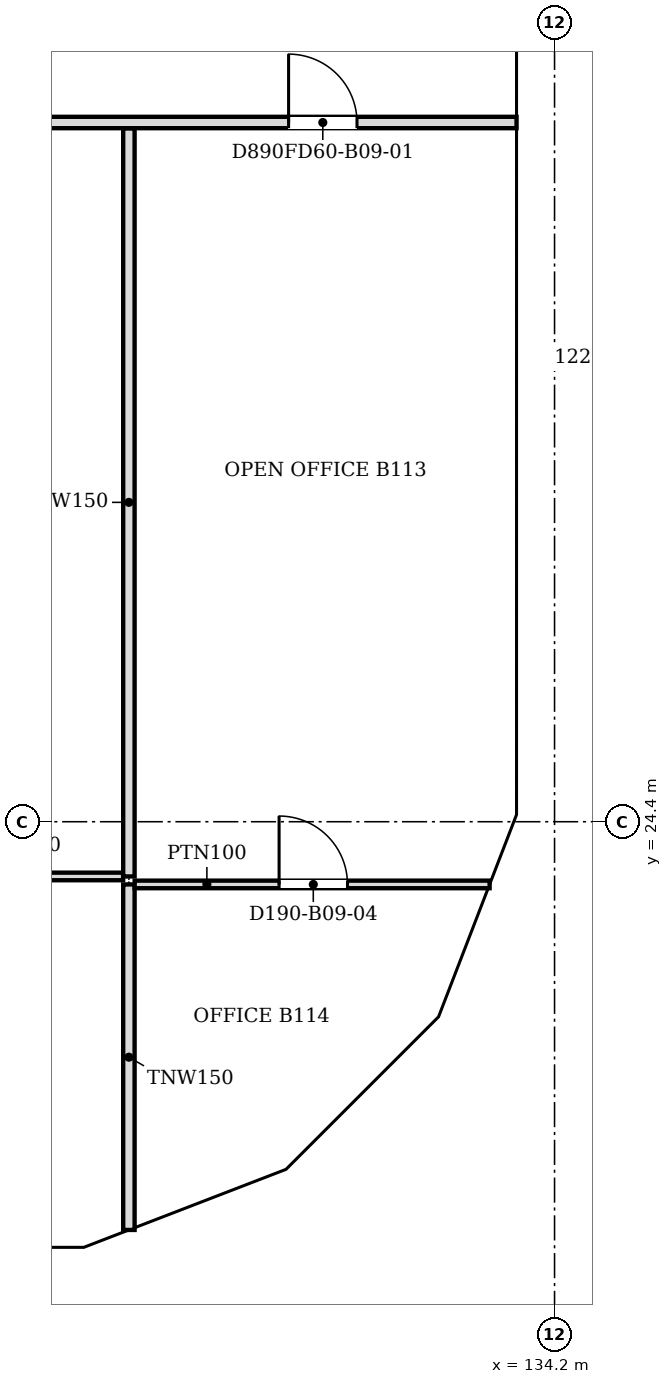
"""IFC4 building model, lengths in metres.
Left out: names, types, materials, properties, quantities, classifications, styles, units other than length and angle.
Written with IfcOpenShell. Run it as: python <this file> out.ifc"""

import sys

from ifc_helpers import new_model, si_unit, direction, frame, frame_2d, origin, place, context, subcontext, project, spatial, polyline, rectangle, outline, extrude, faceted_brep, source, transform, mapped, element, fill, save


model = new_model("IFC4")
c1 = context("Model", 3, precision=1e-05, world=origin(), true_north=direction((0.0, 1.0)))
c2 = subcontext(c1, "Body", "Model", "MODEL_VIEW")
j1 = project(units=[si_unit("LENGTHUNIT", "METRE"), si_unit("PLANEANGLEUNIT", "RADIAN")], contexts=[c1])
p1 = place(None, origin())
s1 = spatial("IfcSite", under=j1, at=p1, CompositionType="ELEMENT")
p2 = place(p1, origin())
s2 = spatial("IfcBuilding", under=s1, at=p2, CompositionType="ELEMENT")
p3 = place(p2, frame((0.0, 0.0, 91.4)))
s3 = spatial("IfcBuildingStorey", under=s2, at=p3, CompositionType="ELEMENT", Elevation=91.4)
m1 = source(origin(), c2, "Body", "Brep", [
    faceted_brep([(3.003, -0.25, 0.0), (3.05, -0.25, 0.06), (3.05, -0.25, 7.54), (3.003, -0.25, 7.6), (0.0, -0.25, 3.8), (0.0, 0.25, 3.8), (2.957, 0.25, 7.541), (2.957, 0.25, 0.059), (3.003, 0.0, 0.0), (3.003, 0.0, 7.6)], [[[0, 1, 2, 3, 4]], [[5, 6, 7]], [[1, 0, 8]], [[9, 3, 2]], [[6, 5, 4, 3, 9]], [[5, 7, 8, 0, 4]], [[1, 8, 7, 6, 9, 2]]]),
])
p4 = place(p3, frame((125.05, 18.55, -3.8), z_axis=(0.0, 0.0, 1.0), x_axis=(1.0, 0.0, 0.0)))
e1 = element("IfcWall", 1, at=p4, inside=s3, PredefinedType="SOLIDWALL", context=c2, shape_type="MappedRepresentation", body=[
    mapped(m1, transform((0.0, 0.0, 0.0), scale=1.0)),
])
m2 = source(origin(), c2, "Body", "SweptSolid", [
    extrude(outline(polyline([(2.803, 6.944), (0.319, 3.8), (2.803, 0.656), (2.803, 6.944)])), frame((0.0, 0.26, 0.0), z_axis=(0.0, -1.0, 0.0), x_axis=(1.0, 0.0, 0.0)), (0.0, 0.0, 1.0), 0.52),
])
p5 = place(p4, origin())
e2 = element("IfcOpeningElement", 2, at=p5, cuts=e1, PredefinedType="OPENING", context=c2, shape_type="MappedRepresentation", body=[
    mapped(m2, transform((0.0, 0.0, 0.0), scale=1.0)),
])
m3 = source(origin(), c2, "Body", "Brep", [
    faceted_brep([(0.047, -0.25, 0.0), (2.997, -0.25, 3.8), (0.047, -0.25, 7.6), (0.0, -0.25, 7.541), (0.0, -0.25, 0.059), (0.093, 0.25, 7.54), (2.944, 0.25, 3.868), (2.944, 0.25, 3.732), (0.093, 0.25, 0.06), (2.997, 0.0, 3.8), (0.047, 0.0, 0.0), (0.047, 0.0, 7.6)], [[[0, 1, 2, 3, 4]], [[5, 6, 7, 8]], [[8, 7, 9, 1, 0, 10]], [[6, 5, 11, 2, 1, 9]], [[3, 2, 11]], [[10, 0, 4]], [[8, 10, 4, 3, 11, 5]], [[9, 7, 6]]]),
])
p6 = place(p3, frame((128.01, 18.533, -3.8), z_axis=(0.0, 0.0, 1.0), x_axis=(0.932990326376, 0.359901446078, 0.0)))
e3 = element("IfcWall", 3, at=p6, inside=s3, PredefinedType="SOLIDWALL", context=c2, shape_type="MappedRepresentation", body=[
    mapped(m3, transform((0.0, 0.0, 0.0), scale=1.0)),
])
m4 = source(origin(), c2, "Body", "SweptSolid", [
    extrude(outline(polyline([(0.247, 0.665), (2.681, 3.8), (0.247, 6.935), (0.247, 0.665)])), frame((0.0, 0.26, 0.0), z_axis=(0.0, -1.0, 0.0), x_axis=(1.0, 0.0, 0.0)), (0.0, 0.0, 1.0), 0.52),
])
p7 = place(p6, origin())
e4 = element("IfcOpeningElement", 4, at=p7, cuts=e3, PredefinedType="OPENING", context=c2, shape_type="MappedRepresentation", body=[
    mapped(m4, transform((0.0, 0.0, 0.0), scale=1.0)),
])
m5 = source(origin(), c2, "Body", "Brep", [
    faceted_brep([(2.944, -0.25, 0.0), (2.997, -0.25, 0.068), (2.997, -0.25, 7.532), (2.944, -0.25, 7.6), (0.0, -0.25, 3.8), (0.053, 0.25, 3.868), (2.891, 0.25, 7.532), (2.891, 0.25, 0.068), (0.053, 0.25, 3.731), (2.944, 0.0, 0.0), (2.944, 0.0, 7.6), (0.0, 0.0, 3.8)], [[[0, 1, 2, 3, 4]], [[5, 6, 7, 8]], [[1, 0, 9]], [[10, 3, 2]], [[6, 5, 11, 4, 3, 10]], [[8, 7, 9, 0, 4, 11]], [[8, 11, 5]], [[1, 9, 7, 6, 10, 2]]]),
])
p8 = place(p3, frame((130.806, 19.612, -3.8), z_axis=(0.0, 0.0, 1.0), x_axis=(0.707106781187, 0.707106781187, 0.0)))
e5 = element("IfcWall", 5, at=p8, inside=s3, PredefinedType="SOLIDWALL", context=c2, shape_type="MappedRepresentation", body=[
    mapped(m5, transform((0.0, 0.0, 0.0), scale=1.0)),
])
m6 = source(origin(), c2, "Body", "SweptSolid", [
    extrude(outline(polyline([(2.744, 6.934), (0.316, 3.8), (2.744, 0.666), (2.744, 6.934)])), frame((0.0, 0.26, 0.0), z_axis=(0.0, -1.0, 0.0), x_axis=(1.0, 0.0, 0.0)), (0.0, 0.0, 1.0), 0.52),
])
p9 = place(p8, origin())
e6 = element("IfcOpeningElement", 6, at=p9, cuts=e5, PredefinedType="OPENING", context=c2, shape_type="MappedRepresentation", body=[
    mapped(m6, transform((0.0, 0.0, 0.0), scale=1.0)),
])
m7 = source(origin(), c2, "Body", "Brep", [
    faceted_brep([(0.053, -0.25, 0.0), (3.003, -0.25, 3.8), (0.053, -0.25, 7.6), (0.0, -0.25, 7.531), (0.0, -0.25, 0.068), (0.106, 0.25, 7.532), (2.957, 0.25, 3.86), (2.957, 0.25, 3.74), (0.106, 0.25, 0.068), (3.003, 0.0, 3.8), (0.053, 0.0, 0.0), (0.053, 0.0, 7.6)], [[[0, 1, 2, 3, 4]], [[5, 6, 7, 8]], [[8, 7, 9, 1, 0, 10]], [[6, 5, 11, 2, 1, 9]], [[3, 2, 11]], [[10, 0, 4]], [[8, 10, 4, 3, 11, 5]], [[9, 7, 6]]]),
])
p10 = place(p3, frame((132.869, 21.644, -3.8), z_axis=(0.0, 0.0, 1.0), x_axis=(0.359855894603, 0.933007896601, 0.0)))
e7 = element("IfcWall", 7, at=p10, inside=s3, PredefinedType="SOLIDWALL", context=c2, shape_type="MappedRepresentation", body=[
    mapped(m7, transform((0.0, 0.0, 0.0), scale=1.0)),
])
m8 = source(origin(), c2, "Body", "SweptSolid", [
    extrude(outline(polyline([(0.253, 0.665), (2.687, 3.8), (0.253, 6.935), (0.253, 0.665)])), frame((0.0, 0.26, 0.0), z_axis=(0.0, -1.0, 0.0), x_axis=(1.0, 0.0, 0.0)), (0.0, 0.0, 1.0), 0.52),
])
p11 = place(p10, origin())
e8 = element("IfcOpeningElement", 8, at=p11, cuts=e7, PredefinedType="OPENING", context=c2, shape_type="MappedRepresentation", body=[
    mapped(m8, transform((0.0, 0.0, 0.0), scale=1.0)),
])
m9 = source(origin(), c2, "Body", "Brep", [
    faceted_brep([(3.003, -0.25, 0.0), (6.053, -0.25, 3.8), (3.003, -0.25, 7.6), (0.0, -0.25, 3.8), (0.047, 0.25, 3.859), (3.003, 0.25, 7.6), (6.053, 0.25, 3.8), (3.003, 0.25, 0.0), (0.047, 0.25, 3.741), (0.0, 0.0, 3.8)], [[[0, 1, 2, 3]], [[4, 5, 6, 7, 8]], [[7, 6, 1, 0]], [[6, 5, 2, 1]], [[5, 4, 9, 3, 2]], [[8, 7, 0, 3, 9]], [[8, 9, 4]]]),
])
p12 = place(p3, frame((133.95, 24.447, -3.8), z_axis=(0.0, 0.0, 1.0), x_axis=(0.0, 1.0, 0.0)))
e9 = element("IfcWall", 9, at=p12, inside=s3, PredefinedType="SOLIDWALL", context=c2, shape_type="MappedRepresentation", body=[
    mapped(m9, transform((0.0, 0.0, 0.0), scale=1.0)),
])
m10 = source(origin(), c2, "Body", "SweptSolid", [
    extrude(outline(polyline([(3.005, 0.401), (5.733, 3.8), (3.005, 7.199), (0.319, 3.8), (3.005, 0.401)])), frame((0.0, 0.26, 0.0), z_axis=(0.0, -1.0, 0.0), x_axis=(1.0, 0.0, 0.0)), (0.0, 0.0, 1.0), 0.52),
])
p13 = place(p12, origin())
e10 = element("IfcOpeningElement", 10, at=p13, cuts=e9, PredefinedType="OPENING", context=c2, shape_type="MappedRepresentation", body=[
    mapped(m10, transform((0.0, 0.0, 0.0), scale=1.0)),
])
m11 = source(origin(), c2, "Body", "SweptSolid", [
    extrude(outline(polyline([(3.05, 0.0), (6.1, 3.8), (3.05, 7.6), (0.0, 3.8), (3.05, 0.0)])), frame((0.0, 0.25, 0.0), z_axis=(0.0, -1.0, 0.0), x_axis=(1.0, 0.0, 0.0)), (0.0, 0.0, 1.0), 0.5),
])
p14 = place(p3, frame((133.95, 30.5, -3.8), z_axis=(0.0, 0.0, 1.0), x_axis=(0.0, 1.0, 0.0)))
e11 = element("IfcWall", 11, at=p14, inside=s3, PredefinedType="SOLIDWALL", context=c2, shape_type="MappedRepresentation", body=[
    mapped(m11, transform((0.0, 0.0, 0.0), scale=1.0)),
])
m12 = source(origin(), c2, "Body", "SweptSolid", [
    extrude(outline(polyline([(3.05, 0.399), (5.78, 3.8), (3.05, 7.2), (0.321, 3.8), (3.05, 0.399)])), frame((0.0, 0.26, 0.0), z_axis=(0.0, -1.0, 0.0), x_axis=(1.0, 0.0, 0.0)), (0.0, 0.0, 1.0), 0.52),
])
p15 = place(p14, origin())
e12 = element("IfcOpeningElement", 12, at=p15, cuts=e11, PredefinedType="OPENING", context=c2, shape_type="MappedRepresentation", body=[
    mapped(m12, transform((0.0, 0.0, 0.0), scale=1.0)),
])
m13 = source(origin(), c2, "Body", "Brep", [
    faceted_brep([(3.05, -0.25, 0.0), (6.053, -0.25, 3.8), (0.0, -0.25, 3.8), (0.0, 0.25, 3.8), (6.007, 0.25, 3.8), (6.007, 0.25, 3.741), (3.05, 0.25, 0.0), (6.053, 0.0, 3.8)], [[[0, 1, 2]], [[3, 4, 5, 6]], [[6, 5, 7, 1, 0]], [[4, 3, 2, 1, 7]], [[3, 6, 0, 2]], [[5, 4, 7]]]),
])
p16 = place(p3, frame((122.0, 18.55, 0.0), z_axis=(0.0, 0.0, 1.0), x_axis=(1.0, 0.0, 0.0)))
e13 = element("IfcWall", 13, at=p16, inside=s3, PredefinedType="SOLIDWALL", context=c2, shape_type="MappedRepresentation", body=[
    mapped(m13, transform((0.0, 0.0, 0.0), scale=1.0)),
])
m14 = source(origin(), c2, "Body", "SweptSolid", [
    extrude(outline(polyline([(3.049, 0.401), (5.537, 3.55), (0.521, 3.55), (3.049, 0.401)])), frame((0.0, 0.26, 0.0), z_axis=(0.0, -1.0, 0.0), x_axis=(1.0, 0.0, 0.0)), (0.0, 0.0, 1.0), 0.52),
])
p17 = place(p16, origin())
e14 = element("IfcOpeningElement", 14, at=p17, cuts=e13, PredefinedType="OPENING", context=c2, shape_type="MappedRepresentation", body=[
    mapped(m14, transform((0.0, 0.0, 0.0), scale=1.0)),
])
m15 = source(origin(), c2, "Body", "Brep", [
    faceted_brep([(2.95, -0.25, 0.0), (3.003, -0.25, 0.068), (3.003, -0.25, 3.8), (0.0, -0.25, 3.8), (0.047, 0.25, 3.8), (2.898, 0.25, 3.8), (2.898, 0.25, 0.068), (0.047, 0.25, 3.74), (2.95, 0.0, 0.0), (0.0, 0.0, 3.8)], [[[0, 1, 2, 3]], [[4, 5, 6, 7]], [[1, 0, 8]], [[5, 4, 9, 3, 2]], [[7, 6, 8, 0, 3, 9]], [[7, 9, 4]], [[1, 8, 6, 5, 2]]]),
])
p18 = place(p3, frame((128.053, 18.55, 0.0), z_axis=(0.0, 0.0, 1.0), x_axis=(0.933007896601, 0.359855894603, 0.0)))
e15 = element("IfcWall", 15, at=p18, inside=s3, PredefinedType="SOLIDWALL", context=c2, shape_type="MappedRepresentation", body=[
    mapped(m15, transform((0.0, 0.0, 0.0), scale=1.0)),
])
m16 = source(origin(), c2, "Body", "SweptSolid", [
    extrude(outline(polyline([(2.75, 3.55), (0.511, 3.55), (2.75, 0.665), (2.75, 3.55)])), frame((0.0, 0.26, 0.0), z_axis=(0.0, -1.0, 0.0), x_axis=(1.0, 0.0, 0.0)), (0.0, 0.0, 1.0), 0.52),
])
p19 = place(p18, origin())
e16 = element("IfcOpeningElement", 16, at=p19, cuts=e15, PredefinedType="OPENING", context=c2, shape_type="MappedRepresentation", body=[
    mapped(m16, transform((0.0, 0.0, 0.0), scale=1.0)),
])
m17 = source(origin(), c2, "Body", "Brep", [
    faceted_brep([(0.053, -0.25, 0.0), (2.997, -0.25, 3.8), (0.0, -0.25, 3.8), (0.0, -0.25, 0.068), (0.106, 0.25, 3.8), (2.944, 0.25, 3.8), (2.944, 0.25, 3.732), (0.106, 0.25, 0.068), (2.997, 0.0, 3.8), (0.053, 0.0, 0.0)], [[[0, 1, 2, 3]], [[4, 5, 6, 7]], [[7, 6, 8, 1, 0, 9]], [[5, 4, 2, 1, 8]], [[9, 0, 3]], [[7, 9, 3, 2, 4]], [[6, 5, 8]]]),
])
p20 = place(p3, frame((130.769, 19.574, 0.0), z_axis=(0.0, 0.0, 1.0), x_axis=(0.707106781187, 0.707106781187, 0.0)))
e17 = element("IfcWall", 17, at=p20, inside=s3, PredefinedType="SOLIDWALL", context=c2, shape_type="MappedRepresentation", body=[
    mapped(m17, transform((0.0, 0.0, 0.0), scale=1.0)),
])
m18 = source(origin(), c2, "Body", "SweptSolid", [
    extrude(outline(polyline([(0.253, 0.667), (2.487, 3.55), (0.253, 3.55), (0.253, 0.667)])), frame((0.0, 0.26, 0.0), z_axis=(0.0, -1.0, 0.0), x_axis=(1.0, 0.0, 0.0)), (0.0, 0.0, 1.0), 0.52),
])
p21 = place(p20, origin())
e18 = element("IfcOpeningElement", 18, at=p21, cuts=e17, PredefinedType="OPENING", context=c2, shape_type="MappedRepresentation", body=[
    mapped(m18, transform((0.0, 0.0, 0.0), scale=1.0)),
])
m19 = source(origin(), c2, "Body", "Brep", [
    faceted_brep([(2.95, -0.25, 0.0), (2.997, -0.25, 0.059), (2.997, -0.25, 3.8), (0.0, -0.25, 3.8), (0.053, 0.25, 3.8), (2.904, 0.25, 3.8), (2.904, 0.25, 0.06), (0.053, 0.25, 3.732), (2.95, 0.0, 0.0), (0.0, 0.0, 3.8)], [[[0, 1, 2, 3]], [[4, 5, 6, 7]], [[1, 0, 8]], [[5, 4, 9, 3, 2]], [[7, 6, 8, 0, 3, 9]], [[7, 9, 4]], [[1, 8, 6, 5, 2]]]),
])
p22 = place(p3, frame((132.888, 21.694, 0.0), z_axis=(0.0, 0.0, 1.0), x_axis=(0.359901446078, 0.932990326376, 0.0)))
e19 = element("IfcWall", 19, at=p22, inside=s3, PredefinedType="SOLIDWALL", context=c2, shape_type="MappedRepresentation", body=[
    mapped(m19, transform((0.0, 0.0, 0.0), scale=1.0)),
])
p23 = place(p22, origin())
e20 = element("IfcOpeningElement", 20, at=p23, cuts=e19, PredefinedType="OPENING", context=c2, shape_type="MappedRepresentation", body=[
    mapped(m16, transform((0.0, 0.0, 0.0), scale=1.0)),
])
m20 = source(origin(), c2, "Body", "Brep", [
    faceted_brep([(0.047, -0.25, 0.0), (3.05, -0.25, 3.8), (0.0, -0.25, 3.8), (0.0, -0.25, 0.06), (0.093, 0.25, 3.8), (3.05, 0.25, 3.8), (0.093, 0.25, 0.059), (0.047, 0.0, 0.0)], [[[0, 1, 2, 3]], [[4, 5, 6]], [[6, 5, 1, 0, 7]], [[5, 4, 2, 1]], [[7, 0, 3]], [[6, 7, 3, 2, 4]]]),
])
p24 = place(p3, frame((133.95, 24.4, 0.0), z_axis=(0.0, 0.0, 1.0), x_axis=(0.0, 1.0, 0.0)))
e21 = element("IfcWall", 21, at=p24, inside=s3, PredefinedType="SOLIDWALL", context=c2, shape_type="MappedRepresentation", body=[
    mapped(m20, transform((0.0, 0.0, 0.0), scale=1.0)),
])
m21 = source(origin(), c2, "Body", "SweptSolid", [
    extrude(outline(polyline([(0.247, 0.656), (2.534, 3.55), (0.247, 3.55), (0.247, 0.656)])), frame((0.0, 0.26, 0.0), z_axis=(0.0, -1.0, 0.0), x_axis=(1.0, 0.0, 0.0)), (0.0, 0.0, 1.0), 0.52),
])
p25 = place(p24, origin())
e22 = element("IfcOpeningElement", 22, at=p25, cuts=e21, PredefinedType="OPENING", context=c2, shape_type="MappedRepresentation", body=[
    mapped(m21, transform((0.0, 0.0, 0.0), scale=1.0)),
])
m22 = source(origin(), c2, "Body", "SweptSolid", [
    extrude(outline(polyline([(3.05, 0.0), (6.1, 3.8), (0.0, 3.8), (3.05, 0.0)])), frame((0.0, 0.25, 0.0), z_axis=(0.0, -1.0, 0.0), x_axis=(1.0, 0.0, 0.0)), (0.0, 0.0, 1.0), 0.5),
])
p26 = place(p3, frame((133.95, 27.45, 0.0), z_axis=(0.0, 0.0, 1.0), x_axis=(0.0, 1.0, 0.0)))
e23 = element("IfcWall", 23, at=p26, inside=s3, PredefinedType="SOLIDWALL", context=c2, shape_type="MappedRepresentation", body=[
    mapped(m22, transform((0.0, 0.0, 0.0), scale=1.0)),
])
m23 = source(origin(), c2, "Body", "SweptSolid", [
    extrude(outline(polyline([(3.05, 0.399), (5.579, 3.55), (0.521, 3.55), (3.05, 0.399)])), frame((0.0, 0.26, 0.0), z_axis=(0.0, -1.0, 0.0), x_axis=(1.0, 0.0, 0.0)), (0.0, 0.0, 1.0), 0.52),
])
p27 = place(p26, origin())
e24 = element("IfcOpeningElement", 24, at=p27, cuts=e23, PredefinedType="OPENING", context=c2, shape_type="MappedRepresentation", body=[
    mapped(m23, transform((0.0, 0.0, 0.0), scale=1.0)),
])
m24 = source(origin(), c2, "Body", "Brep", [
    faceted_brep([(3.05, -0.25, 0.0), (6.1, -0.25, 3.8), (6.1, -0.25, 3.8), (0.0, -0.25, 3.8), (0.0, 0.25, 3.8), (6.1, 0.25, 3.8), (6.1, 0.25, 3.8), (3.05, 0.25, 0.0)], [[[0, 1, 2, 3]], [[4, 5, 6, 7]], [[7, 6, 1, 0]], [[5, 4, 3, 2]], [[4, 7, 0, 3]], [[1, 6, 5, 2]]]),
])
p28 = place(p3, frame((133.95, 33.55, 0.0), z_axis=(0.0, 0.0, 1.0), x_axis=(0.0, 1.0, 0.0)))
e25 = element("IfcWall", 25, at=p28, inside=s3, PredefinedType="SOLIDWALL", context=c2, shape_type="MappedRepresentation", body=[
    mapped(m24, transform((0.0, 0.0, 0.0), scale=1.0)),
])
p29 = place(p28, origin())
e26 = element("IfcOpeningElement", 26, at=p29, cuts=e25, PredefinedType="OPENING", context=c2, shape_type="MappedRepresentation", body=[
    mapped(m23, transform((0.0, 0.0, 0.0), scale=1.0)),
])
p30 = place(p3, frame((128.6, 19.029, 0.0), z_axis=(0.0, 0.0, 1.0), x_axis=(0.0, 1.0, 0.0)))
e27 = element("IfcWall", 27, at=p30, inside=s3, PredefinedType="PARTITIONING", context=c2, shape_type="SweptSolid", body=[
    extrude(rectangle(XDim=4.546, YDim=0.15, at=frame_2d((2.273, 0.0))), origin(), (0.0, 0.0, 1.0), 2.895),
])
p31 = place(p3, frame((133.346, 23.575, 0.0), z_axis=(0.0, 0.0, 1.0), x_axis=(-1.0, 0.0, 0.0)))
e28 = element("IfcWall", 28, at=p31, inside=s3, PredefinedType="PARTITIONING", context=c2, shape_type="SweptSolid", body=[
    extrude(rectangle(XDim=4.67, YDim=0.1, at=frame_2d((2.335, 0.0))), origin(), (0.0, 0.0, 1.0), 2.895),
])
m25 = source(origin(), c2, "Body", "SweptSolid", [
    extrude(rectangle(XDim=0.9, YDim=2.1, at=frame_2d((0.45, 1.05))), frame((0.0, 0.06, 0.0), z_axis=(0.0, -1.0, 0.0), x_axis=(1.0, 0.0, 0.0)), (0.0, 0.0, 1.0), 0.12),
])
p32 = place(p31, frame((1.87, 0.0, 0.0)))
e29 = element("IfcOpeningElement", 29, at=p32, cuts=e28, PredefinedType="OPENING", context=c2, shape_type="MappedRepresentation", body=[
    mapped(m25, transform((0.0, 0.0, 0.0), scale=1.0)),
])
p33 = place(p3, frame((128.524, 23.68, 0.0), z_axis=(0.0, 0.0, 1.0), x_axis=(-1.0, 0.0, 0.0)))
e30 = element("IfcWall", 30, at=p33, inside=s3, PredefinedType="PARTITIONING", context=c2, shape_type="SweptSolid", body=[
    extrude(rectangle(XDim=6.179, YDim=0.1, at=frame_2d((3.09, 0.0))), origin(), (0.0, 0.0, 1.0), 2.895),
])
p34 = place(p33, frame((2.679, 0.0, 0.0)))
e31 = element("IfcOpeningElement", 31, at=p34, cuts=e30, PredefinedType="OPENING", context=c2, shape_type="MappedRepresentation", body=[
    mapped(m25, transform((0.0, 0.0, 0.0), scale=1.0)),
])
p35 = place(p3, frame((128.6, 23.68, 0.0), z_axis=(0.0, 0.0, 1.0), x_axis=(0.0, 1.0, 0.0)))
e32 = element("IfcWall", 32, at=p35, inside=s3, PredefinedType="PARTITIONING", context=c2, shape_type="SweptSolid", body=[
    extrude(rectangle(XDim=9.844, YDim=0.15, at=frame_2d((4.922, 0.0))), origin(), (0.0, 0.0, 1.0), 2.895),
])
p36 = place(p3, frame((133.7, 33.6, 0.0), z_axis=(0.0, 0.0, 1.0), x_axis=(-1.0, 0.0, 0.0)))
e33 = element("IfcWall", 33, at=p36, inside=s3, PredefinedType="PARTITIONING", context=c2, shape_type="SweptSolid", body=[
    extrude(rectangle(XDim=47.8, YDim=0.15, at=frame_2d((23.9, 0.0))), origin(), (0.0, 0.0, 1.0), 2.895),
])
m26 = source(origin(), c2, "Body", "SweptSolid", [
    extrude(rectangle(XDim=0.9, YDim=2.1, at=frame_2d((0.45, 1.05))), frame((0.0, 0.085, 0.0), z_axis=(0.0, -1.0, 0.0), x_axis=(1.0, 0.0, 0.0)), (0.0, 0.0, 1.0), 0.17),
])
p37 = place(p36, frame((2.099, 0.0, 0.0)))
e34 = element("IfcOpeningElement", 34, at=p37, cuts=e33, PredefinedType="OPENING", context=c2, shape_type="MappedRepresentation", body=[
    mapped(m26, transform((0.0, 0.0, 0.0), scale=1.0)),
])
m27 = source(origin(), c2, "Body", "SweptSolid", [
    extrude(rectangle(XDim=1.0, YDim=2.1, at=frame_2d((0.5, 1.05))), frame((0.0, 0.085, 0.0), z_axis=(0.0, -1.0, 0.0), x_axis=(1.0, 0.0, 0.0)), (0.0, 0.0, 1.0), 0.17),
])
p38 = place(p36, frame((38.399, 0.0, 0.0)))
e35 = element("IfcOpeningElement", 35, at=p38, cuts=e33, PredefinedType="OPENING", context=c2, shape_type="MappedRepresentation", body=[
    mapped(m27, transform((0.0, 0.0, 0.0), scale=1.0)),
])
p39 = place(p36, frame((44.3, 0.0, 0.0)))
e36 = element("IfcOpeningElement", 36, at=p39, cuts=e33, PredefinedType="OPENING", context=c2, shape_type="MappedRepresentation", body=[
    mapped(m26, transform((0.0, 0.0, 0.0), scale=1.0)),
])
p40 = place(p36, frame((32.4, 0.0, 0.0)))
e37 = element("IfcOpeningElement", 37, at=p40, cuts=e33, PredefinedType="OPENING", context=c2, shape_type="MappedRepresentation", body=[
    mapped(m26, transform((0.0, 0.0, 0.0), scale=1.0)),
])
p41 = place(p36, frame((10.799, 0.0, 0.0)))
e38 = element("IfcOpeningElement", 38, at=p41, cuts=e33, PredefinedType="OPENING", context=c2, shape_type="MappedRepresentation", body=[
    mapped(m26, transform((0.0, 0.0, 0.0), scale=1.0)),
])
p42 = place(p36, frame((23.0, 0.0, 0.0)))
e39 = element("IfcOpeningElement", 39, at=p42, cuts=e33, PredefinedType="OPENING", context=c2, shape_type="MappedRepresentation", body=[
    mapped(m26, transform((0.0, 0.0, 0.0), scale=1.0)),
])
m28 = source(origin(), c2, "Body", "SweptSolid", [
    extrude(rectangle(XDim=0.9, YDim=2.1, at=frame_2d((0.45, 1.05))), frame((0.0, 0.025, 0.0), z_axis=(0.0, -1.0, 0.0), x_axis=(1.0, 0.0, 0.0)), (0.0, 0.0, 1.0), 0.05),
])
p43 = place(p32, origin())
e40 = element("IfcDoor", 40, at=p43, inside=s3, OperationType="SINGLE_SWING_RIGHT", PredefinedType="DOOR", context=c2, shape_type="MappedRepresentation", body=[
    mapped(m28, transform((0.0, 0.0, 0.0), scale=1.0)),
])
fill(e29, e40)
p44 = place(p37, origin())
e41 = element("IfcDoor", 41, at=p44, inside=s3, OperationType="SINGLE_SWING_RIGHT", PredefinedType="DOOR", context=c2, shape_type="MappedRepresentation", body=[
    mapped(m28, transform((0.0, 0.0, 0.0), scale=1.0)),
])
fill(e34, e41)
save(model, sys.argv[1])
